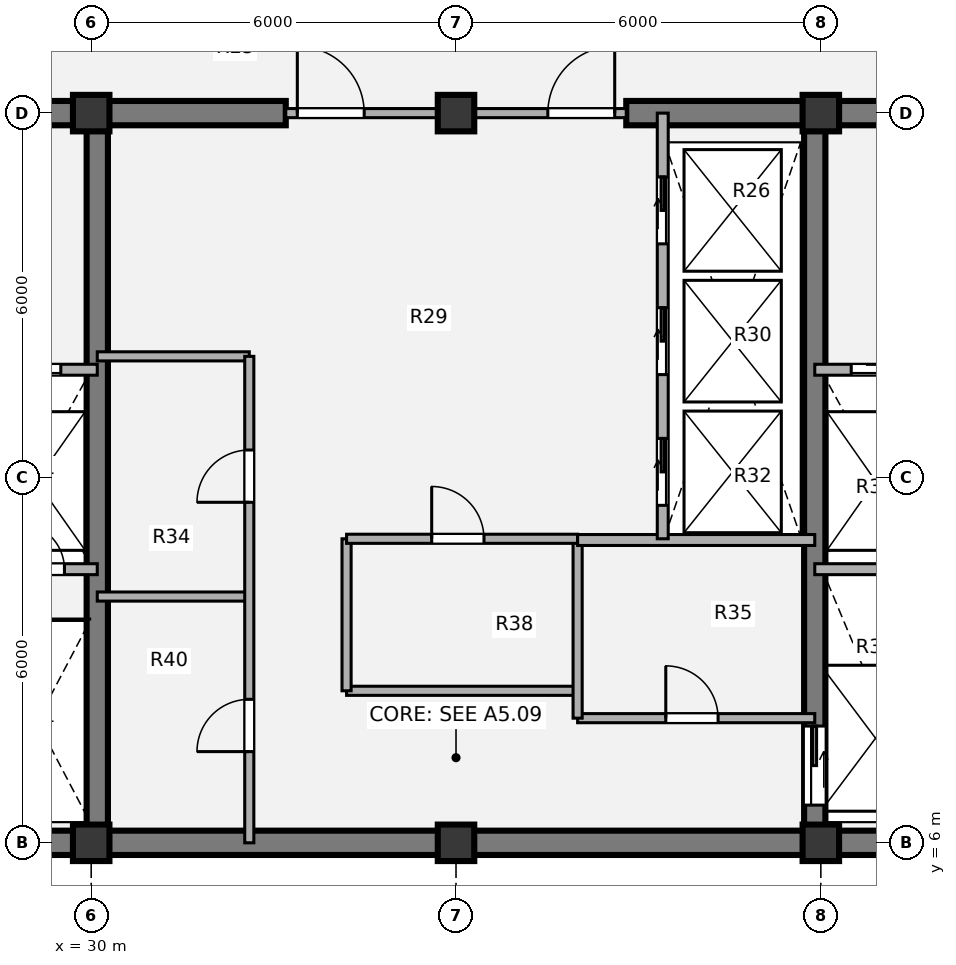
"""IFC4 building model, lengths in metres.
Left out: names, types, materials, properties, quantities, classifications, styles, units other than length and angle.
Written with IfcOpenShell. Run it as: python <this file> out.ifc"""

import sys

from ifc_helpers import new_model, si_unit, direction, frame, frame_2d, origin, origin_2d, place, context, subcontext, project, spatial, rectangle, extrude, source, transform, mapped, element, fill, save


model = new_model("IFC4")
c1 = context("Model", 3, precision=1e-05, world=origin(), true_north=direction((0.0, 1.0)))
c2 = subcontext(c1, "Body", "Model", "MODEL_VIEW")
j1 = project(units=[si_unit("LENGTHUNIT", "METRE"), si_unit("PLANEANGLEUNIT", "RADIAN")], contexts=[c1])
p1 = place(None, origin())
s1 = spatial("IfcSite", under=j1, at=p1, CompositionType="ELEMENT")
p2 = place(p1, origin())
s2 = spatial("IfcBuilding", under=s1, at=p2, CompositionType="ELEMENT")
p3 = place(p2, frame((0.0, 0.0, 260.82)))
s3 = spatial("IfcBuildingStorey", under=s2, at=p3, CompositionType="ELEMENT", Elevation=260.82)
m1 = source(origin(), c2, "Body", "SweptSolid", [
    extrude(rectangle(XDim=0.6, YDim=0.6, at=origin_2d()), origin(), (0.0, 0.0, 1.0), 3.78),
])
for number, where, z_axis, x_axis in (
    (1, (30.0, 6.0, 0.0), (0.0, 0.0, 1.0), (1.0, 0.0, 0.0)),
    (2, (36.0, 6.0, 0.0), (0.0, 0.0, 1.0), (1.0, 0.0, 0.0)),
    (3, (42.0, 6.0, 0.0), (0.0, 0.0, 1.0), (1.0, 0.0, 0.0)),
    (4, (30.0, 18.0, 0.0), (0.0, 0.0, 1.0), (1.0, 0.0, 0.0)),
    (5, (36.0, 18.0, 0.0), (0.0, 0.0, 1.0), (1.0, 0.0, 0.0)),
    (6, (42.0, 18.0, 0.0), (0.0, 0.0, 1.0), (1.0, 0.0, 0.0)),
):
    element("IfcColumn", number, at=place(p3, frame(where, z_axis=z_axis, x_axis=x_axis)), inside=s3, PredefinedType="COLUMN", context=c2, shape_type="MappedRepresentation", body=[
        mapped(m1, transform((0.0, 0.0, 0.0), x_axis=(1.0, 0.0, 0.0), y_axis=(0.0, 1.0, 0.0), z_axis=(0.0, 0.0, 1.0), scale=1.0)),
    ])
p4 = place(p3, frame((48.2, 6.0, 0.0), z_axis=(0.0, 0.0, 1.0), x_axis=(-1.0, 0.0, 0.0)))
e7 = element("IfcWall", 7, at=p4, inside=s3, PredefinedType="SHEAR", context=c2, shape_type="SweptSolid", body=[
    extrude(rectangle(XDim=24.4, YDim=0.4, at=frame_2d((12.2, 0.0))), origin(), (0.0, 0.0, 1.0), 3.78),
])
p5 = place(p3, frame((23.8, 18.0, 0.0), z_axis=(0.0, 0.0, 1.0), x_axis=(1.0, 0.0, 0.0)))
e8 = element("IfcWall", 8, at=p5, inside=s3, PredefinedType="SHEAR", context=c2, shape_type="SweptSolid", body=[
    extrude(rectangle(XDim=9.4, YDim=0.4, at=frame_2d((4.7, 0.0))), origin(), (0.0, 0.0, 1.0), 3.78),
])
p6 = place(p5, frame((2.95, 0.0, 0.0)))
e9 = element("IfcOpeningElement", 9, at=p6, cuts=e8, PredefinedType="OPENING", context=c2, shape_type="SweptSolid", body=[
    extrude(rectangle(XDim=1.1, YDim=2.1, at=origin_2d()), frame((0.55, 0.21, 1.05), z_axis=(0.0, -1.0, 0.0), x_axis=(1.0, 0.0, 0.0)), (0.0, 0.0, 1.0), 0.42),
])
p7 = place(p3, frame((38.8, 18.0, 0.0), z_axis=(0.0, 0.0, 1.0), x_axis=(1.0, 0.0, 0.0)))
e10 = element("IfcWall", 10, at=p7, inside=s3, PredefinedType="SHEAR", context=c2, shape_type="SweptSolid", body=[
    extrude(rectangle(XDim=9.4, YDim=0.4, at=frame_2d((4.7, 0.0))), origin(), (0.0, 0.0, 1.0), 3.78),
])
p8 = place(p7, frame((5.45, 0.0, 0.0)))
e11 = element("IfcOpeningElement", 11, at=p8, cuts=e10, PredefinedType="OPENING", context=c2, shape_type="SweptSolid", body=[
    extrude(rectangle(XDim=1.1, YDim=2.1, at=origin_2d()), frame((0.55, 0.21, 1.05), z_axis=(0.0, -1.0, 0.0), x_axis=(1.0, 0.0, 0.0)), (0.0, 0.0, 1.0), 0.42),
])
p9 = place(p3, frame((30.1, 6.0, 0.0), z_axis=(0.0, 0.0, 1.0), x_axis=(0.0, 1.0, 0.0)))
e12 = element("IfcWall", 12, at=p9, inside=s3, PredefinedType="SHEAR", context=c2, shape_type="SweptSolid", body=[
    extrude(rectangle(XDim=12.0, YDim=0.35, at=frame_2d((6.0, 0.0))), origin(), (0.0, 0.0, 1.0), 3.78),
])
p10 = place(p3, frame((41.9, 18.0, 0.0), z_axis=(0.0, 0.0, 1.0), x_axis=(0.0, -1.0, 0.0)))
e13 = element("IfcWall", 13, at=p10, inside=s3, PredefinedType="SHEAR", context=c2, shape_type="SweptSolid", body=[
    extrude(rectangle(XDim=12.0, YDim=0.35, at=frame_2d((6.0, 0.0))), origin(), (0.0, 0.0, 1.0), 3.78),
])
p11 = place(p10, frame((10.08, 0.0, 0.0)))
e14 = element("IfcOpeningElement", 14, at=p11, cuts=e13, PredefinedType="OPENING", context=c2, shape_type="SweptSolid", body=[
    extrude(rectangle(XDim=1.3, YDim=2.1, at=origin_2d()), frame((0.65, 0.185, 1.05), z_axis=(0.0, -1.0, 0.0), x_axis=(1.0, 0.0, 0.0)), (0.0, 0.0, 1.0), 0.37),
])
p12 = place(p3, frame((30.1, 14.0, 0.0), z_axis=(0.0, 0.0, 1.0), x_axis=(1.0, 0.0, 0.0)))
e15 = element("IfcWall", 15, at=p12, inside=s3, PredefinedType="PARTITIONING", context=c2, shape_type="SweptSolid", body=[
    extrude(rectangle(XDim=2.5, YDim=0.15, at=frame_2d((1.25, 0.0))), origin(), (0.0, 0.0, 1.0), 3.5),
])
p13 = place(p3, frame((34.2, 8.5, 0.0), z_axis=(0.0, 0.0, 1.0), x_axis=(1.0, 0.0, 0.0)))
e16 = element("IfcWall", 16, at=p13, inside=s3, PredefinedType="PARTITIONING", context=c2, shape_type="SweptSolid", body=[
    extrude(rectangle(XDim=3.8, YDim=0.15, at=frame_2d((1.9, 0.0))), origin(), (0.0, 0.0, 1.0), 3.5),
])
p14 = place(p3, frame((38.0, 8.05, 0.0), z_axis=(0.0, 0.0, 1.0), x_axis=(1.0, 0.0, 0.0)))
e17 = element("IfcWall", 17, at=p14, inside=s3, PredefinedType="PARTITIONING", context=c2, shape_type="SweptSolid", body=[
    extrude(rectangle(XDim=3.9, YDim=0.15, at=frame_2d((1.95, 0.0))), origin(), (0.0, 0.0, 1.0), 3.5),
])
p15 = place(p14, frame((1.45, 0.0, 0.0)))
e18 = element("IfcOpeningElement", 18, at=p15, cuts=e17, PredefinedType="OPENING", context=c2, shape_type="SweptSolid", body=[
    extrude(rectangle(XDim=0.86, YDim=2.1, at=origin_2d()), frame((0.43, 0.085, 1.05), z_axis=(0.0, -1.0, 0.0), x_axis=(1.0, 0.0, 0.0)), (0.0, 0.0, 1.0), 0.17),
])
p16 = place(p3, frame((34.2, 8.5, 0.0), z_axis=(0.0, 0.0, 1.0), x_axis=(0.0, 1.0, 0.0)))
e19 = element("IfcWall", 19, at=p16, inside=s3, PredefinedType="PARTITIONING", context=c2, shape_type="SweptSolid", body=[
    extrude(rectangle(XDim=2.5, YDim=0.15, at=frame_2d((1.25, 0.0))), origin(), (0.0, 0.0, 1.0), 3.5),
])
p17 = place(p3, frame((38.0, 8.05, 0.0), z_axis=(0.0, 0.0, 1.0), x_axis=(0.0, 1.0, 0.0)))
e20 = element("IfcWall", 20, at=p17, inside=s3, PredefinedType="PARTITIONING", context=c2, shape_type="SweptSolid", body=[
    extrude(rectangle(XDim=2.95, YDim=0.15, at=frame_2d((1.475, 0.0))), origin(), (0.0, 0.0, 1.0), 3.5),
])
p18 = place(p3, frame((34.2, 11.0, 0.0), z_axis=(0.0, 0.0, 1.0), x_axis=(1.0, 0.0, 0.0)))
e21 = element("IfcWall", 21, at=p18, inside=s3, PredefinedType="PARTITIONING", context=c2, shape_type="SweptSolid", body=[
    extrude(rectangle(XDim=3.8, YDim=0.15, at=frame_2d((1.9, 0.0))), origin(), (0.0, 0.0, 1.0), 3.5),
])
p19 = place(p18, frame((1.4, 0.0, 0.0)))
e22 = element("IfcOpeningElement", 22, at=p19, cuts=e21, PredefinedType="OPENING", context=c2, shape_type="SweptSolid", body=[
    extrude(rectangle(XDim=0.86, YDim=2.1, at=origin_2d()), frame((0.43, 0.085, 1.05), z_axis=(0.0, -1.0, 0.0), x_axis=(1.0, 0.0, 0.0)), (0.0, 0.0, 1.0), 0.17),
])
p20 = place(p3, frame((38.0, 10.98, 0.0), z_axis=(0.0, 0.0, 1.0), x_axis=(1.0, 0.0, 0.0)))
e23 = element("IfcWall", 23, at=p20, inside=s3, PredefinedType="PARTITIONING", context=c2, shape_type="SweptSolid", body=[
    extrude(rectangle(XDim=3.9, YDim=0.18, at=frame_2d((1.95, 0.0))), origin(), (0.0, 0.0, 1.0), 3.5),
])
p21 = place(p3, frame((30.1, 10.05, 0.0), z_axis=(0.0, 0.0, 1.0), x_axis=(1.0, 0.0, 0.0)))
e24 = element("IfcWall", 24, at=p21, inside=s3, PredefinedType="PARTITIONING", context=c2, shape_type="SweptSolid", body=[
    extrude(rectangle(XDim=2.5, YDim=0.15, at=frame_2d((1.25, 0.0))), origin(), (0.0, 0.0, 1.0), 3.5),
])
p22 = place(p3, frame((32.6, 6.0, 0.0), z_axis=(0.0, 0.0, 1.0), x_axis=(0.0, 1.0, 0.0)))
e25 = element("IfcWall", 25, at=p22, inside=s3, PredefinedType="PARTITIONING", context=c2, shape_type="SweptSolid", body=[
    extrude(rectangle(XDim=8.0, YDim=0.15, at=frame_2d((4.0, 0.0))), origin(), (0.0, 0.0, 1.0), 3.5),
])
p23 = place(p22, frame((1.5, 0.0, 0.0)))
e26 = element("IfcOpeningElement", 26, at=p23, cuts=e25, PredefinedType="OPENING", context=c2, shape_type="SweptSolid", body=[
    extrude(rectangle(XDim=0.86, YDim=2.1, at=origin_2d()), frame((0.43, 0.085, 1.05), z_axis=(0.0, -1.0, 0.0), x_axis=(1.0, 0.0, 0.0)), (0.0, 0.0, 1.0), 0.17),
])
p24 = place(p22, frame((5.6, 0.0, 0.0)))
e27 = element("IfcOpeningElement", 27, at=p24, cuts=e25, PredefinedType="OPENING", context=c2, shape_type="SweptSolid", body=[
    extrude(rectangle(XDim=0.86, YDim=2.1, at=origin_2d()), frame((0.43, 0.085, 1.05), z_axis=(0.0, -1.0, 0.0), x_axis=(1.0, 0.0, 0.0)), (0.0, 0.0, 1.0), 0.17),
])
p25 = place(p3, frame((33.2, 18.0, 0.0), z_axis=(0.0, 0.0, 1.0), x_axis=(1.0, 0.0, 0.0)))
e28 = element("IfcWall", 28, at=p25, inside=s3, PredefinedType="PARTITIONING", context=c2, shape_type="SweptSolid", body=[
    extrude(rectangle(XDim=5.6, YDim=0.15, at=frame_2d((2.8, 0.0))), origin(), (0.0, 0.0, 1.0), 2.515),
])
p26 = place(p25, frame((0.19, 0.0, 0.0)))
e29 = element("IfcOpeningElement", 29, at=p26, cuts=e28, PredefinedType="OPENING", context=c2, shape_type="SweptSolid", body=[
    extrude(rectangle(XDim=1.1, YDim=2.1, at=origin_2d()), frame((0.55, 0.085, 1.05), z_axis=(0.0, -1.0, 0.0), x_axis=(1.0, 0.0, 0.0)), (0.0, 0.0, 1.0), 0.17),
])
p27 = place(p25, frame((4.31, 0.0, 0.0)))
e30 = element("IfcOpeningElement", 30, at=p27, cuts=e28, PredefinedType="OPENING", context=c2, shape_type="SweptSolid", body=[
    extrude(rectangle(XDim=1.1, YDim=2.1, at=origin_2d()), frame((0.55, 0.085, 1.05), z_axis=(0.0, -1.0, 0.0), x_axis=(1.0, 0.0, 0.0)), (0.0, 0.0, 1.0), 0.17),
])
p28 = place(p3, frame((24.0, 13.78, 0.0), z_axis=(0.0, 0.0, 1.0), x_axis=(1.0, 0.0, 0.0)))
e31 = element("IfcWall", 31, at=p28, inside=s3, PredefinedType="PARTITIONING", context=c2, shape_type="SweptSolid", body=[
    extrude(rectangle(XDim=6.1, YDim=0.18, at=frame_2d((3.05, 0.0))), origin(), (0.0, 0.0, 1.0), 3.5),
])
p29 = place(p28, frame((1.15, 0.0, 0.0)))
e32 = element("IfcOpeningElement", 32, at=p29, cuts=e31, PredefinedType="OPENING", context=c2, shape_type="SweptSolid", body=[
    extrude(rectangle(XDim=1.1, YDim=2.1, at=origin_2d()), frame((0.55, 0.1, 1.05), z_axis=(0.0, -1.0, 0.0), x_axis=(1.0, 0.0, 0.0)), (0.0, 0.0, 1.0), 0.2),
])
p30 = place(p28, frame((4.4, 0.0, 0.0)))
e33 = element("IfcOpeningElement", 33, at=p30, cuts=e31, PredefinedType="OPENING", context=c2, shape_type="SweptSolid", body=[
    extrude(rectangle(XDim=1.1, YDim=2.1, at=origin_2d()), frame((0.55, 0.1, 1.05), z_axis=(0.0, -1.0, 0.0), x_axis=(1.0, 0.0, 0.0)), (0.0, 0.0, 1.0), 0.2),
])
p31 = place(p3, frame((28.15, 10.5, 0.0), z_axis=(0.0, 0.0, 1.0), x_axis=(1.0, 0.0, 0.0)))
e34 = element("IfcWall", 34, at=p31, inside=s3, PredefinedType="PARTITIONING", context=c2, shape_type="SweptSolid", body=[
    extrude(rectangle(XDim=1.95, YDim=0.18, at=frame_2d((0.975, 0.0))), origin(), (0.0, 0.0, 1.0), 3.5),
])
p32 = place(p31, frame((0.65, 0.0, 0.0)))
e35 = element("IfcOpeningElement", 35, at=p32, cuts=e34, PredefinedType="OPENING", context=c2, shape_type="SweptSolid", body=[
    extrude(rectangle(XDim=0.76, YDim=2.05, at=origin_2d()), frame((0.38, 0.1, 1.025), z_axis=(0.0, -1.0, 0.0), x_axis=(1.0, 0.0, 0.0)), (0.0, 0.0, 1.0), 0.2),
])
p33 = place(p3, frame((41.9, 13.78, 0.0), z_axis=(0.0, 0.0, 1.0), x_axis=(1.0, 0.0, 0.0)))
e36 = element("IfcWall", 36, at=p33, inside=s3, PredefinedType="PARTITIONING", context=c2, shape_type="SweptSolid", body=[
    extrude(rectangle(XDim=6.1, YDim=0.18, at=frame_2d((3.05, 0.0))), origin(), (0.0, 0.0, 1.0), 3.5),
])
p34 = place(p33, frame((0.6, 0.0, 0.0)))
e37 = element("IfcOpeningElement", 37, at=p34, cuts=e36, PredefinedType="OPENING", context=c2, shape_type="SweptSolid", body=[
    extrude(rectangle(XDim=1.1, YDim=2.1, at=origin_2d()), frame((0.55, 0.1, 1.05), z_axis=(0.0, -1.0, 0.0), x_axis=(1.0, 0.0, 0.0)), (0.0, 0.0, 1.0), 0.2),
])
p35 = place(p33, frame((3.8, 0.0, 0.0)))
e38 = element("IfcOpeningElement", 38, at=p35, cuts=e36, PredefinedType="OPENING", context=c2, shape_type="SweptSolid", body=[
    extrude(rectangle(XDim=1.1, YDim=2.1, at=origin_2d()), frame((0.55, 0.1, 1.05), z_axis=(0.0, -1.0, 0.0), x_axis=(1.0, 0.0, 0.0)), (0.0, 0.0, 1.0), 0.2),
])
p36 = place(p3, frame((41.9, 10.5, 0.0), z_axis=(0.0, 0.0, 1.0), x_axis=(1.0, 0.0, 0.0)))
e39 = element("IfcWall", 39, at=p36, inside=s3, PredefinedType="PARTITIONING", context=c2, shape_type="SweptSolid", body=[
    extrude(rectangle(XDim=1.95, YDim=0.18, at=frame_2d((0.975, 0.0))), origin(), (0.0, 0.0, 1.0), 3.5),
])
p37 = place(p3, frame((39.4, 11.0, 0.0), z_axis=(0.0, 0.0, 1.0), x_axis=(0.0, 1.0, 0.0)))
e40 = element("IfcWall", 40, at=p37, inside=s3, PredefinedType="PARTITIONING", context=c2, shape_type="SweptSolid", body=[
    extrude(rectangle(XDim=7.0, YDim=0.18, at=frame_2d((3.5, 0.0))), origin(), (0.0, 0.0, 1.0), 3.5),
])
p38 = place(p37, frame((0.55, 0.0, 0.0)))
e41 = element("IfcOpeningElement", 41, at=p38, cuts=e40, PredefinedType="OPENING", context=c2, shape_type="SweptSolid", body=[
    extrude(rectangle(XDim=1.1, YDim=2.1, at=origin_2d()), frame((0.55, 0.1, 1.05), z_axis=(0.0, -1.0, 0.0), x_axis=(1.0, 0.0, 0.0)), (0.0, 0.0, 1.0), 0.2),
])
p39 = place(p37, frame((2.7, 0.0, 0.0)))
e42 = element("IfcOpeningElement", 42, at=p39, cuts=e40, PredefinedType="OPENING", context=c2, shape_type="SweptSolid", body=[
    extrude(rectangle(XDim=1.1, YDim=2.1, at=origin_2d()), frame((0.55, 0.1, 1.05), z_axis=(0.0, -1.0, 0.0), x_axis=(1.0, 0.0, 0.0)), (0.0, 0.0, 1.0), 0.2),
])
p40 = place(p37, frame((4.85, 0.0, 0.0)))
e43 = element("IfcOpeningElement", 43, at=p40, cuts=e40, PredefinedType="OPENING", context=c2, shape_type="SweptSolid", body=[
    extrude(rectangle(XDim=1.1, YDim=2.1, at=origin_2d()), frame((0.55, 0.1, 1.05), z_axis=(0.0, -1.0, 0.0), x_axis=(1.0, 0.0, 0.0)), (0.0, 0.0, 1.0), 0.2),
])
m2 = source(origin(), c2, "Body", "SweptSolid", [
    extrude(rectangle(XDim=0.86, YDim=2.1, at=origin_2d()), frame((0.43, 0.025, 1.05), z_axis=(0.0, -1.0, 0.0), x_axis=(1.0, 0.0, 0.0)), (0.0, 0.0, 1.0), 0.05),
])
p41 = place(p15, origin())
e44 = element("IfcDoor", 44, at=p41, inside=s3, OperationType="SINGLE_SWING_LEFT", PredefinedType="DOOR", context=c2, shape_type="MappedRepresentation", body=[
    mapped(m2, transform((0.0, 0.0, 0.0), x_axis=(1.0, 0.0, 0.0), y_axis=(0.0, 1.0, 0.0), z_axis=(0.0, 0.0, 1.0), scale=1.0)),
])
fill(e18, e44)
p42 = place(p19, origin())
e45 = element("IfcDoor", 45, at=p42, inside=s3, OperationType="SINGLE_SWING_LEFT", PredefinedType="DOOR", context=c2, shape_type="MappedRepresentation", body=[
    mapped(m2, transform((0.0, 0.0, 0.0), x_axis=(1.0, 0.0, 0.0), y_axis=(0.0, 1.0, 0.0), z_axis=(0.0, 0.0, 1.0), scale=1.0)),
])
fill(e22, e45)
p43 = place(p23, origin())
e46 = element("IfcDoor", 46, at=p43, inside=s3, OperationType="SINGLE_SWING_LEFT", PredefinedType="DOOR", context=c2, shape_type="MappedRepresentation", body=[
    mapped(m2, transform((0.0, 0.0, 0.0), x_axis=(1.0, 0.0, 0.0), y_axis=(0.0, 1.0, 0.0), z_axis=(0.0, 0.0, 1.0), scale=1.0)),
])
fill(e26, e46)
p44 = place(p24, origin())
e47 = element("IfcDoor", 47, at=p44, inside=s3, OperationType="SINGLE_SWING_LEFT", PredefinedType="DOOR", context=c2, shape_type="MappedRepresentation", body=[
    mapped(m2, transform((0.0, 0.0, 0.0), x_axis=(1.0, 0.0, 0.0), y_axis=(0.0, 1.0, 0.0), z_axis=(0.0, 0.0, 1.0), scale=1.0)),
])
fill(e27, e47)
m3 = source(origin(), c2, "Body", "SweptSolid", [
    extrude(rectangle(XDim=1.1, YDim=2.1, at=origin_2d()), frame((0.55, 0.025, 1.05), z_axis=(0.0, -1.0, 0.0), x_axis=(1.0, 0.0, 0.0)), (0.0, 0.0, 1.0), 0.05),
])
p45 = place(p26, origin())
e48 = element("IfcDoor", 48, at=p45, inside=s3, OperationType="SINGLE_SWING_LEFT", PredefinedType="DOOR", context=c2, shape_type="MappedRepresentation", body=[
    mapped(m3, transform((0.0, 0.0, 0.0), x_axis=(1.0, 0.0, 0.0), y_axis=(0.0, 1.0, 0.0), z_axis=(0.0, 0.0, 1.0), scale=1.0)),
])
fill(e29, e48)
p46 = place(p27, origin())
e49 = element("IfcDoor", 49, at=p46, inside=s3, OperationType="SINGLE_SWING_RIGHT", PredefinedType="DOOR", context=c2, shape_type="MappedRepresentation", body=[
    mapped(m3, transform((0.0, 0.0, 0.0), x_axis=(1.0, 0.0, 0.0), y_axis=(0.0, 1.0, 0.0), z_axis=(0.0, 0.0, 1.0), scale=1.0)),
])
fill(e30, e49)
m4 = source(origin(), c2, "Body", "SweptSolid", [
    extrude(rectangle(XDim=1.1, YDim=2.1, at=origin_2d()), frame((0.55, 0.025, 1.05), z_axis=(0.0, -1.0, 0.0), x_axis=(1.0, 0.0, 0.0)), (0.0, 0.0, 1.0), 0.05),
])
p47 = place(p30, origin())
e50 = element("IfcDoor", 50, at=p47, inside=s3, OperationType="SLIDING_TO_LEFT", PredefinedType="DOOR", context=c2, shape_type="MappedRepresentation", body=[
    mapped(m4, transform((0.0, 0.0, 0.0), x_axis=(1.0, 0.0, 0.0), y_axis=(0.0, 1.0, 0.0), z_axis=(0.0, 0.0, 1.0), scale=1.0)),
])
fill(e33, e50)
m5 = source(origin(), c2, "Body", "SweptSolid", [
    extrude(rectangle(XDim=0.76, YDim=2.05, at=origin_2d()), frame((0.38, 0.025, 1.025), z_axis=(0.0, -1.0, 0.0), x_axis=(1.0, 0.0, 0.0)), (0.0, 0.0, 1.0), 0.05),
])
p48 = place(p32, origin())
e51 = element("IfcDoor", 51, at=p48, inside=s3, OperationType="SINGLE_SWING_LEFT", PredefinedType="DOOR", context=c2, shape_type="MappedRepresentation", body=[
    mapped(m5, transform((0.0, 0.0, 0.0), x_axis=(1.0, 0.0, 0.0), y_axis=(0.0, 1.0, 0.0), z_axis=(0.0, 0.0, 1.0), scale=1.0)),
])
fill(e35, e51)
p49 = place(p34, origin())
e52 = element("IfcDoor", 52, at=p49, inside=s3, OperationType="SLIDING_TO_RIGHT", PredefinedType="DOOR", context=c2, shape_type="MappedRepresentation", body=[
    mapped(m4, transform((0.0, 0.0, 0.0), x_axis=(1.0, 0.0, 0.0), y_axis=(0.0, 1.0, 0.0), z_axis=(0.0, 0.0, 1.0), scale=1.0)),
])
fill(e37, e52)
m6 = source(origin(), c2, "Body", "SweptSolid", [
    extrude(rectangle(XDim=1.3, YDim=2.1, at=origin_2d()), frame((0.65, 0.025, 1.05), z_axis=(0.0, -1.0, 0.0), x_axis=(1.0, 0.0, 0.0)), (0.0, 0.0, 1.0), 0.05),
])
p50 = place(p11, origin())
e53 = element("IfcDoor", 53, at=p50, inside=s3, OperationType="SLIDING_TO_LEFT", PredefinedType="DOOR", context=c2, shape_type="MappedRepresentation", body=[
    mapped(m6, transform((0.0, 0.0, 0.0), x_axis=(1.0, 0.0, 0.0), y_axis=(0.0, 1.0, 0.0), z_axis=(0.0, 0.0, 1.0), scale=1.0)),
])
fill(e14, e53)
p51 = place(p38, origin())
e54 = element("IfcDoor", 54, at=p51, inside=s3, OperationType="SLIDING_TO_RIGHT", PredefinedType="DOOR", context=c2, shape_type="MappedRepresentation", body=[
    mapped(m4, transform((0.0, 0.0, 0.0), x_axis=(1.0, 0.0, 0.0), y_axis=(0.0, 1.0, 0.0), z_axis=(0.0, 0.0, 1.0), scale=1.0)),
])
fill(e41, e54)
p52 = place(p39, origin())
e55 = element("IfcDoor", 55, at=p52, inside=s3, OperationType="SLIDING_TO_RIGHT", PredefinedType="DOOR", context=c2, shape_type="MappedRepresentation", body=[
    mapped(m4, transform((0.0, 0.0, 0.0), x_axis=(1.0, 0.0, 0.0), y_axis=(0.0, 1.0, 0.0), z_axis=(0.0, 0.0, 1.0), scale=1.0)),
])
fill(e42, e55)
p53 = place(p40, origin())
e56 = element("IfcDoor", 56, at=p53, inside=s3, OperationType="SLIDING_TO_RIGHT", PredefinedType="DOOR", context=c2, shape_type="MappedRepresentation", body=[
    mapped(m4, transform((0.0, 0.0, 0.0), x_axis=(1.0, 0.0, 0.0), y_axis=(0.0, 1.0, 0.0), z_axis=(0.0, 0.0, 1.0), scale=1.0)),
])
fill(e43, e56)
save(model, sys.argv[1])
